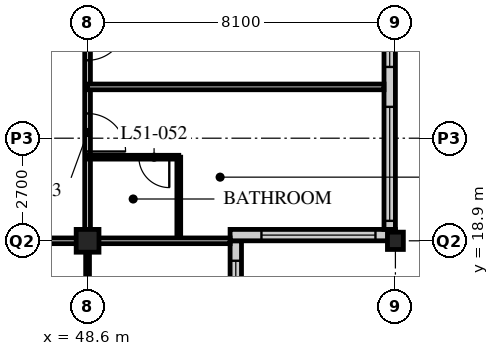
"""IFC4 building model, lengths in metres.
Left out: names, types, materials, properties, quantities, classifications, styles, units other than length and angle.
Written with IfcOpenShell. Run it as: python <this file> out.ifc"""

import sys

from ifc_helpers import new_model, si_unit, direction, frame, frame_2d, origin, origin_2d, place, context, subcontext, project, spatial, rectangle, hollow_rectangle, i_section, extrude, element, fill, save


model = new_model("IFC4")
c1 = context("Model", 3, precision=1e-05, world=origin(), true_north=direction((0.0, 1.0)))
c2 = subcontext(c1, "Body", "Model", "MODEL_VIEW")
j1 = project(units=[si_unit("LENGTHUNIT", "METRE"), si_unit("PLANEANGLEUNIT", "RADIAN")], contexts=[c1])
p1 = place(None, origin())
s1 = spatial("IfcSite", under=j1, at=p1, CompositionType="ELEMENT")
p2 = place(p1, origin())
s2 = spatial("IfcBuilding", under=s1, at=p2, CompositionType="ELEMENT")
p3 = place(p2, frame((0.0, 0.0, 199.2)))
s3 = spatial("IfcBuildingStorey", under=s2, at=p3, CompositionType="ELEMENT", Elevation=199.2)
p4 = place(p3, frame((48.6, 18.9, 0.0), z_axis=(0.0, 0.0, 1.0), x_axis=(1.0, 0.0, 0.0)))
e1 = element("IfcColumn", 1, at=p4, inside=s3, PredefinedType="COLUMN", context=c2, shape_type="SweptSolid", body=[
    extrude(hollow_rectangle(XDim=0.6, YDim=0.6, WallThickness=0.05, at=origin_2d()), origin(), (0.0, 0.0, 1.0), 3.6),
])
p5 = place(p3, frame((56.7, 18.9, 0.0), z_axis=(0.0, 0.0, 1.0), x_axis=(1.0, 0.0, 0.0)))
e2 = element("IfcColumn", 2, at=p5, inside=s3, PredefinedType="COLUMN", context=c2, shape_type="SweptSolid", body=[
    extrude(i_section(OverallWidth=0.418, OverallDepth=0.456, WebThickness=0.042, FlangeThickness=0.067, FilletRadius=0.015, at=origin_2d()), origin(), (0.0, 0.0, 1.0), 3.6),
])
p6 = place(p3, frame((52.5, 15.15, 0.0), z_axis=(0.0, 0.0, 1.0), x_axis=(0.0, 1.0, 0.0)))
e3 = element("IfcWall", 3, at=p6, inside=s3, PredefinedType="SOLIDWALL", context=c2, shape_type="SweptSolid", body=[
    extrude(rectangle(XDim=3.75, YDim=0.3, at=frame_2d((1.875, 0.0))), origin(), (0.0, 0.0, 1.0), 3.39),
])
p7 = place(p6, frame((0.225, 0.0, 0.6)))
e4 = element("IfcOpeningElement", 4, at=p7, cuts=e3, PredefinedType="OPENING", context=c2, shape_type="SweptSolid", body=[
    extrude(rectangle(XDim=3.0, YDim=2.0, at=frame_2d((1.5, 1.0))), frame((0.0, 0.16, 0.0), z_axis=(0.0, -1.0, 0.0), x_axis=(1.0, 0.0, 0.0)), (0.0, 0.0, 1.0), 0.32),
])
p8 = place(p3, frame((52.35, 19.05, 0.0), z_axis=(0.0, 0.0, 1.0), x_axis=(1.0, 0.0, 0.0)))
e5 = element("IfcWall", 5, at=p8, inside=s3, PredefinedType="SOLIDWALL", context=c2, shape_type="SweptSolid", body=[
    extrude(rectangle(XDim=4.35, YDim=0.3, at=frame_2d((2.175, 0.0))), origin(), (0.0, 0.0, 1.0), 3.39),
])
p9 = place(p8, frame((0.825, 0.0, 0.6)))
e6 = element("IfcOpeningElement", 6, at=p9, cuts=e5, PredefinedType="OPENING", context=c2, shape_type="SweptSolid", body=[
    extrude(rectangle(XDim=3.0, YDim=2.0, at=frame_2d((1.5, 1.0))), frame((0.0, 0.16, 0.0), z_axis=(0.0, -1.0, 0.0), x_axis=(1.0, 0.0, 0.0)), (0.0, 0.0, 1.0), 0.32),
])
p10 = place(p3, frame((56.55, 19.2, 0.0), z_axis=(0.0, 0.0, 1.0), x_axis=(0.0, 1.0, 0.0)))
e7 = element("IfcWall", 7, at=p10, inside=s3, PredefinedType="SOLIDWALL", context=c2, shape_type="SweptSolid", body=[
    extrude(rectangle(XDim=32.1, YDim=0.3, at=frame_2d((16.05, 0.0))), origin(), (0.0, 0.0, 1.0), 3.39),
])
p11 = place(p10, frame((0.225, 0.0, 0.6)))
e8 = element("IfcOpeningElement", 8, at=p11, cuts=e7, PredefinedType="OPENING", context=c2, shape_type="SweptSolid", body=[
    extrude(rectangle(XDim=3.0, YDim=2.4, at=frame_2d((1.5, 1.2))), frame((0.0, 0.16, 0.0), z_axis=(0.0, -1.0, 0.0), x_axis=(1.0, 0.0, 0.0)), (0.0, 0.0, 1.0), 0.32),
])
p12 = place(p10, frame((4.275, 0.0, 0.6)))
e9 = element("IfcOpeningElement", 9, at=p12, cuts=e7, PredefinedType="OPENING", context=c2, shape_type="SweptSolid", body=[
    extrude(rectangle(XDim=3.0, YDim=2.4, at=frame_2d((1.5, 1.2))), frame((0.0, 0.16, 0.0), z_axis=(0.0, -1.0, 0.0), x_axis=(1.0, 0.0, 0.0)), (0.0, 0.0, 1.0), 0.32),
])
p13 = place(p10, frame((8.325, 0.0, 0.6)))
e10 = element("IfcOpeningElement", 10, at=p13, cuts=e7, PredefinedType="OPENING", context=c2, shape_type="SweptSolid", body=[
    extrude(rectangle(XDim=3.0, YDim=2.4, at=frame_2d((1.5, 1.2))), frame((0.0, 0.16, 0.0), z_axis=(0.0, -1.0, 0.0), x_axis=(1.0, 0.0, 0.0)), (0.0, 0.0, 1.0), 0.32),
])
p14 = place(p10, frame((12.375, 0.0, 0.6)))
e11 = element("IfcOpeningElement", 11, at=p14, cuts=e7, PredefinedType="OPENING", context=c2, shape_type="SweptSolid", body=[
    extrude(rectangle(XDim=3.0, YDim=2.4, at=frame_2d((1.5, 1.2))), frame((0.0, 0.16, 0.0), z_axis=(0.0, -1.0, 0.0), x_axis=(1.0, 0.0, 0.0)), (0.0, 0.0, 1.0), 0.32),
])
p15 = place(p10, frame((16.425, 0.0, 0.6)))
e12 = element("IfcOpeningElement", 12, at=p15, cuts=e7, PredefinedType="OPENING", context=c2, shape_type="SweptSolid", body=[
    extrude(rectangle(XDim=3.0, YDim=2.4, at=frame_2d((1.5, 1.2))), frame((0.0, 0.16, 0.0), z_axis=(0.0, -1.0, 0.0), x_axis=(1.0, 0.0, 0.0)), (0.0, 0.0, 1.0), 0.32),
])
p16 = place(p10, frame((20.475, 0.0, 0.6)))
e13 = element("IfcOpeningElement", 13, at=p16, cuts=e7, PredefinedType="OPENING", context=c2, shape_type="SweptSolid", body=[
    extrude(rectangle(XDim=3.0, YDim=2.4, at=frame_2d((1.5, 1.2))), frame((0.0, 0.16, 0.0), z_axis=(0.0, -1.0, 0.0), x_axis=(1.0, 0.0, 0.0)), (0.0, 0.0, 1.0), 0.32),
])
p17 = place(p10, frame((24.525, 0.0, 0.6)))
e14 = element("IfcOpeningElement", 14, at=p17, cuts=e7, PredefinedType="OPENING", context=c2, shape_type="SweptSolid", body=[
    extrude(rectangle(XDim=3.0, YDim=2.4, at=frame_2d((1.5, 1.2))), frame((0.0, 0.16, 0.0), z_axis=(0.0, -1.0, 0.0), x_axis=(1.0, 0.0, 0.0)), (0.0, 0.0, 1.0), 0.32),
])
p18 = place(p10, frame((28.575, 0.0, 0.6)))
e15 = element("IfcOpeningElement", 15, at=p18, cuts=e7, PredefinedType="OPENING", context=c2, shape_type="SweptSolid", body=[
    extrude(rectangle(XDim=3.0, YDim=2.4, at=frame_2d((1.5, 1.2))), frame((0.0, 0.16, 0.0), z_axis=(0.0, -1.0, 0.0), x_axis=(1.0, 0.0, 0.0)), (0.0, 0.0, 1.0), 0.32),
])
p19 = place(p3, frame((8.1, 18.9, 0.0), z_axis=(0.0, 0.0, 1.0), x_axis=(1.0, 0.0, 0.0)))
e16 = element("IfcWall", 16, at=p19, inside=s3, PredefinedType="PARTITIONING", context=c2, shape_type="SweptSolid", body=[
    extrude(rectangle(XDim=40.5, YDim=0.15, at=frame_2d((20.25, 0.0))), origin(), (0.0, 0.0, 1.0), 2.778),
])
p20 = place(p19, frame((4.45, 0.0, 0.0)))
e17 = element("IfcOpeningElement", 17, at=p20, cuts=e16, PredefinedType="OPENING", context=c2, shape_type="SweptSolid", body=[
    extrude(rectangle(XDim=1.0, YDim=2.1, at=frame_2d((0.5, 1.05))), frame((0.0, 0.085, 0.0), z_axis=(0.0, -1.0, 0.0), x_axis=(1.0, 0.0, 0.0)), (0.0, 0.0, 1.0), 0.17),
])
p21 = place(p19, frame((17.1, 0.0, 0.0)))
e18 = element("IfcOpeningElement", 18, at=p21, cuts=e16, PredefinedType="OPENING", context=c2, shape_type="SweptSolid", body=[
    extrude(rectangle(XDim=1.0, YDim=2.1, at=frame_2d((0.5, 1.05))), frame((0.0, 0.085, 0.0), z_axis=(0.0, -1.0, 0.0), x_axis=(1.0, 0.0, 0.0)), (0.0, 0.0, 1.0), 0.17),
])
p22 = place(p19, frame((28.75, 0.0, 0.0)))
e19 = element("IfcOpeningElement", 19, at=p22, cuts=e16, PredefinedType="OPENING", context=c2, shape_type="SweptSolid", body=[
    extrude(rectangle(XDim=1.0, YDim=2.1, at=frame_2d((0.5, 1.05))), frame((0.0, 0.085, 0.0), z_axis=(0.0, -1.0, 0.0), x_axis=(1.0, 0.0, 0.0)), (0.0, 0.0, 1.0), 0.17),
])
p23 = place(p19, frame((2.625, 0.0, 0.0)))
e20 = element("IfcOpeningElement", 20, at=p23, cuts=e16, PredefinedType="OPENING", context=c2, shape_type="SweptSolid", body=[
    extrude(rectangle(XDim=1.0, YDim=2.1, at=frame_2d((0.5, 1.05))), frame((0.0, 0.085, 0.0), z_axis=(0.0, -1.0, 0.0), x_axis=(1.0, 0.0, 0.0)), (0.0, 0.0, 1.0), 0.17),
])
p24 = place(p19, frame((36.875, 0.0, 0.0)))
e21 = element("IfcOpeningElement", 21, at=p24, cuts=e16, PredefinedType="OPENING", context=c2, shape_type="SweptSolid", body=[
    extrude(rectangle(XDim=1.0, YDim=2.1, at=frame_2d((0.5, 1.05))), frame((0.0, 0.085, 0.0), z_axis=(0.0, -1.0, 0.0), x_axis=(1.0, 0.0, 0.0)), (0.0, 0.0, 1.0), 0.17),
])
p25 = place(p3, frame((48.6, 18.9, 0.0), z_axis=(0.0, 0.0, 1.0), x_axis=(0.0, 1.0, 0.0)))
e22 = element("IfcWall", 22, at=p25, inside=s3, PredefinedType="PARTITIONING", context=c2, shape_type="SweptSolid", body=[
    extrude(rectangle(XDim=24.3, YDim=0.15, at=frame_2d((12.15, 0.0))), origin(), (0.0, 0.0, 1.0), 2.778),
])
p26 = place(p25, frame((2.35, 0.0, 0.0)))
e23 = element("IfcOpeningElement", 23, at=p26, cuts=e22, PredefinedType="OPENING", context=c2, shape_type="SweptSolid", body=[
    extrude(rectangle(XDim=1.0, YDim=2.1, at=frame_2d((0.5, 1.05))), frame((0.0, 0.085, 0.0), z_axis=(0.0, -1.0, 0.0), x_axis=(1.0, 0.0, 0.0)), (0.0, 0.0, 1.0), 0.17),
])
p27 = place(p25, frame((4.75, 0.0, 0.0)))
e24 = element("IfcOpeningElement", 24, at=p27, cuts=e22, PredefinedType="OPENING", context=c2, shape_type="SweptSolid", body=[
    extrude(rectangle(XDim=1.0, YDim=2.1, at=frame_2d((0.5, 1.05))), frame((0.0, 0.085, 0.0), z_axis=(0.0, -1.0, 0.0), x_axis=(1.0, 0.0, 0.0)), (0.0, 0.0, 1.0), 0.17),
])
p28 = place(p25, frame((9.0, 0.0, 0.0)))
e25 = element("IfcOpeningElement", 25, at=p28, cuts=e22, PredefinedType="OPENING", context=c2, shape_type="SweptSolid", body=[
    extrude(rectangle(XDim=1.0, YDim=2.1, at=frame_2d((0.5, 1.05))), frame((0.0, 0.085, 0.0), z_axis=(0.0, -1.0, 0.0), x_axis=(1.0, 0.0, 0.0)), (0.0, 0.0, 1.0), 0.17),
])
p29 = place(p3, frame((51.0, 18.9, 0.0), z_axis=(0.0, 0.0, 1.0), x_axis=(0.0, 1.0, 0.0)))
e26 = element("IfcWall", 26, at=p29, inside=s3, PredefinedType="PARTITIONING", context=c2, shape_type="SweptSolid", body=[
    extrude(rectangle(XDim=2.2, YDim=0.1, at=frame_2d((1.1, 0.0))), origin(), (0.0, 0.0, 1.0), 3.39),
])
p30 = place(p3, frame((48.6, 21.1, 0.0), z_axis=(0.0, 0.0, 1.0), x_axis=(1.0, 0.0, 0.0)))
e27 = element("IfcWall", 27, at=p30, inside=s3, PredefinedType="PARTITIONING", context=c2, shape_type="SweptSolid", body=[
    extrude(rectangle(XDim=2.4, YDim=0.1, at=frame_2d((1.2, 0.0))), origin(), (0.0, 0.0, 1.0), 3.39),
])
p31 = place(p30, frame((1.35, 0.0, 0.0)))
e28 = element("IfcOpeningElement", 28, at=p31, cuts=e27, PredefinedType="OPENING", context=c2, shape_type="SweptSolid", body=[
    extrude(rectangle(XDim=0.8, YDim=2.1, at=frame_2d((0.4, 1.05))), frame((0.0, 0.06, 0.0), z_axis=(0.0, -1.0, 0.0), x_axis=(1.0, 0.0, 0.0)), (0.0, 0.0, 1.0), 0.12),
])
p32 = place(p3, frame((48.6, 22.95, 0.0), z_axis=(0.0, 0.0, 1.0), x_axis=(1.0, 0.0, 0.0)))
e29 = element("IfcWall", 29, at=p32, inside=s3, PredefinedType="PARTITIONING", context=c2, shape_type="SweptSolid", body=[
    extrude(rectangle(XDim=7.8, YDim=0.15, at=frame_2d((3.9, 0.0))), origin(), (0.0, 0.0, 1.0), 3.39),
])
p33 = place(p3, frame((48.6, 18.9, 0.0), z_axis=(0.0, 0.0, 1.0), x_axis=(0.0, -1.0, 0.0)))
e30 = element("IfcWall", 30, at=p33, inside=s3, PredefinedType="PARTITIONING", context=c2, shape_type="SweptSolid", body=[
    extrude(rectangle(XDim=2.4, YDim=0.1, at=frame_2d((1.2, 0.0))), origin(), (0.0, 0.0, 1.0), 2.778),
])
p34 = place(p3, frame((48.6, 18.9, 0.0), z_axis=(0.0, 0.0, 1.0), x_axis=(1.0, 0.0, 0.0)))
e31 = element("IfcWall", 31, at=p34, inside=s3, PredefinedType="PARTITIONING", context=c2, shape_type="SweptSolid", body=[
    extrude(rectangle(XDim=3.75, YDim=0.15, at=frame_2d((1.875, 0.0))), origin(), (0.0, 0.0, 1.0), 2.778),
])
p35 = place(p7, origin())
e32 = element("IfcWindow", 32, at=p35, inside=s3, PartitioningType="SINGLE_PANEL", PredefinedType="WINDOW", context=c2, shape_type="SweptSolid", body=[
    extrude(rectangle(XDim=3.0, YDim=2.0, at=frame_2d((1.5, 1.0))), frame((0.0, 0.03, 0.0), z_axis=(0.0, -1.0, 0.0), x_axis=(1.0, 0.0, 0.0)), (0.0, 0.0, 1.0), 0.06),
])
fill(e4, e32)
p36 = place(p9, origin())
e33 = element("IfcWindow", 33, at=p36, inside=s3, PartitioningType="SINGLE_PANEL", PredefinedType="WINDOW", context=c2, shape_type="SweptSolid", body=[
    extrude(rectangle(XDim=3.0, YDim=2.0, at=frame_2d((1.5, 1.0))), frame((0.0, 0.03, 0.0), z_axis=(0.0, -1.0, 0.0), x_axis=(1.0, 0.0, 0.0)), (0.0, 0.0, 1.0), 0.06),
])
fill(e6, e33)
p37 = place(p11, origin())
e34 = element("IfcWindow", 34, at=p37, inside=s3, PartitioningType="SINGLE_PANEL", PredefinedType="WINDOW", context=c2, shape_type="SweptSolid", body=[
    extrude(rectangle(XDim=3.0, YDim=2.4, at=frame_2d((1.5, 1.2))), frame((0.0, 0.03, 0.0), z_axis=(0.0, -1.0, 0.0), x_axis=(1.0, 0.0, 0.0)), (0.0, 0.0, 1.0), 0.06),
])
fill(e8, e34)
p38 = place(p12, origin())
e35 = element("IfcWindow", 35, at=p38, inside=s3, PartitioningType="SINGLE_PANEL", PredefinedType="WINDOW", context=c2, shape_type="SweptSolid", body=[
    extrude(rectangle(XDim=3.0, YDim=2.4, at=frame_2d((1.5, 1.2))), frame((0.0, 0.03, 0.0), z_axis=(0.0, -1.0, 0.0), x_axis=(1.0, 0.0, 0.0)), (0.0, 0.0, 1.0), 0.06),
])
fill(e9, e35)
p39 = place(p31, origin())
e36 = element("IfcDoor", 36, at=p39, inside=s3, OperationType="SINGLE_SWING_LEFT", PredefinedType="DOOR", context=c2, shape_type="SweptSolid", body=[
    extrude(rectangle(XDim=0.8, YDim=2.1, at=frame_2d((0.4, 1.05))), frame((0.0, 0.025, 0.0), z_axis=(0.0, -1.0, 0.0), x_axis=(1.0, 0.0, 0.0)), (0.0, 0.0, 1.0), 0.05),
])
fill(e28, e36)
p40 = place(p26, origin())
e37 = element("IfcDoor", 37, at=p40, inside=s3, OperationType="SINGLE_SWING_RIGHT", PredefinedType="DOOR", context=c2, shape_type="SweptSolid", body=[
    extrude(rectangle(XDim=1.0, YDim=2.1, at=frame_2d((0.5, 1.05))), frame((0.0, 0.025, 0.0), z_axis=(0.0, -1.0, 0.0), x_axis=(1.0, 0.0, 0.0)), (0.0, 0.0, 1.0), 0.05),
])
fill(e23, e37)
p41 = place(p27, origin())
e38 = element("IfcDoor", 38, at=p41, inside=s3, OperationType="SINGLE_SWING_LEFT", PredefinedType="DOOR", context=c2, shape_type="SweptSolid", body=[
    extrude(rectangle(XDim=1.0, YDim=2.1, at=frame_2d((0.5, 1.05))), frame((0.0, 0.025, 0.0), z_axis=(0.0, -1.0, 0.0), x_axis=(1.0, 0.0, 0.0)), (0.0, 0.0, 1.0), 0.05),
])
fill(e24, e38)
save(model, sys.argv[1])
